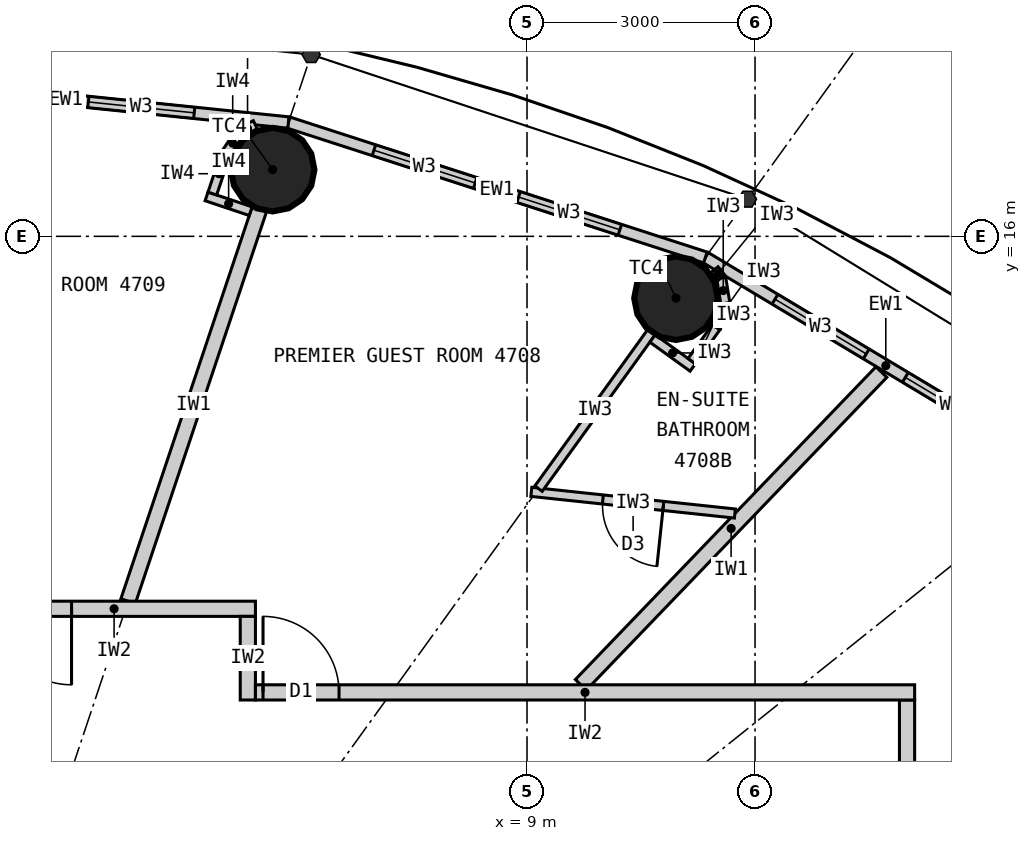
"""IFC4 building model, lengths in metres.
Left out: names, types, materials, properties, quantities, classifications, styles, units other than length and angle.
Written with IfcOpenShell. Run it as: python <this file> out.ifc"""

import sys

from ifc_helpers import new_model, si_unit, direction, frame, frame_2d, origin, origin_2d, place, context, subcontext, project, spatial, rectangle, circle, extrude, element, fill, save


model = new_model("IFC4")
c1 = context("Model", 3, precision=1e-05, world=origin(), true_north=direction((0.0, 1.0)))
c2 = subcontext(c1, "Body", "Model", "MODEL_VIEW")
j1 = project(units=[si_unit("LENGTHUNIT", "METRE"), si_unit("PLANEANGLEUNIT", "RADIAN")], contexts=[c1])
p1 = place(None, origin())
s1 = spatial("IfcSite", under=j1, at=p1, CompositionType="ELEMENT")
p2 = place(p1, origin())
s2 = spatial("IfcBuilding", under=s1, at=p2, CompositionType="ELEMENT")
p3 = place(p2, frame((0.0, 0.0, 176.4)))
s3 = spatial("IfcBuildingStorey", under=s2, at=p3, CompositionType="ELEMENT", Elevation=176.4)
for number, where, z_axis, x_axis in (
    (1, (10.96, 15.186, 0.0), (0.0, 0.0, 1.0), (1.0, 0.0, 0.0)),
    (2, (5.653, 16.877, 0.0), (0.0, 0.0, 1.0), (1.0, 0.0, 0.0)),
):
    element("IfcColumn", number, at=place(p3, frame(where, z_axis=z_axis, x_axis=x_axis)), inside=s3, PredefinedType="COLUMN", context=c2, shape_type="SweptSolid", body=[
        extrude(circle(Radius=0.55, at=origin_2d()), origin(), (0.0, 0.0, 1.0), 3.3),
    ])
p4 = place(p3, frame((16.095, 12.876, 0.0), z_axis=(0.0, 0.0, 1.0), x_axis=(-0.857695199231, 0.514158482587, 0.0)))
e3 = element("IfcWall", 3, at=p4, inside=s3, PredefinedType="ELEMENTEDWALL", context=c2, shape_type="SweptSolid", body=[
    extrude(rectangle(XDim=5.536, YDim=0.15, at=frame_2d((2.768, 0.0))), origin(), (0.0, 0.0, 1.0), 3.12),
])
p5 = place(p4, frame((1.068, 0.0, 0.9)))
e4 = element("IfcOpeningElement", 4, at=p5, cuts=e3, PredefinedType="OPENING", context=c2, shape_type="SweptSolid", body=[
    extrude(rectangle(XDim=1.4, YDim=1.9, at=frame_2d((0.7, 0.95))), frame((0.0, 0.085, 0.0), z_axis=(0.0, -1.0, 0.0), x_axis=(1.0, 0.0, 0.0)), (0.0, 0.0, 1.0), 0.17),
])
p6 = place(p4, frame((3.068, 0.0, 0.9)))
e5 = element("IfcOpeningElement", 5, at=p6, cuts=e3, PredefinedType="OPENING", context=c2, shape_type="SweptSolid", body=[
    extrude(rectangle(XDim=1.4, YDim=1.9, at=frame_2d((0.7, 0.95))), frame((0.0, 0.085, 0.0), z_axis=(0.0, -1.0, 0.0), x_axis=(1.0, 0.0, 0.0)), (0.0, 0.0, 1.0), 0.17),
])
p7 = place(p3, frame((11.346, 15.722, 0.0), z_axis=(0.0, 0.0, 1.0), x_axis=(-0.951432482129, 0.307857486429, 0.0)))
e6 = element("IfcWall", 6, at=p7, inside=s3, PredefinedType="ELEMENTEDWALL", context=c2, shape_type="SweptSolid", body=[
    extrude(rectangle(XDim=5.766, YDim=0.15, at=frame_2d((2.883, 0.0))), origin(), (0.0, 0.0, 1.0), 3.12),
])
p8 = place(p7, frame((1.183, 0.0, 0.9)))
e7 = element("IfcOpeningElement", 7, at=p8, cuts=e6, PredefinedType="OPENING", context=c2, shape_type="SweptSolid", body=[
    extrude(rectangle(XDim=1.4, YDim=1.9, at=frame_2d((0.7, 0.95))), frame((0.0, 0.085, 0.0), z_axis=(0.0, -1.0, 0.0), x_axis=(1.0, 0.0, 0.0)), (0.0, 0.0, 1.0), 0.17),
])
p9 = place(p7, frame((3.183, 0.0, 0.9)))
e8 = element("IfcOpeningElement", 8, at=p9, cuts=e6, PredefinedType="OPENING", context=c2, shape_type="SweptSolid", body=[
    extrude(rectangle(XDim=1.4, YDim=1.9, at=frame_2d((0.7, 0.95))), frame((0.0, 0.085, 0.0), z_axis=(0.0, -1.0, 0.0), x_axis=(1.0, 0.0, 0.0)), (0.0, 0.0, 1.0), 0.17),
])
p10 = place(p3, frame((5.86, 17.497, 0.0), z_axis=(0.0, 0.0, 1.0), x_axis=(-0.994751738032, 0.102318032045, 0.0)))
e9 = element("IfcWall", 9, at=p10, inside=s3, PredefinedType="ELEMENTEDWALL", context=c2, shape_type="SweptSolid", body=[
    extrude(rectangle(XDim=5.891, YDim=0.15, at=frame_2d((2.946, 0.0))), origin(), (0.0, 0.0, 1.0), 3.12),
])
p11 = place(p10, frame((1.246, 0.0, 0.9)))
e10 = element("IfcOpeningElement", 10, at=p11, cuts=e9, PredefinedType="OPENING", context=c2, shape_type="SweptSolid", body=[
    extrude(rectangle(XDim=1.4, YDim=1.9, at=frame_2d((0.7, 0.95))), frame((0.0, 0.085, 0.0), z_axis=(0.0, -1.0, 0.0), x_axis=(1.0, 0.0, 0.0)), (0.0, 0.0, 1.0), 0.17),
])
p12 = place(p10, frame((3.246, 0.0, 0.9)))
e11 = element("IfcOpeningElement", 11, at=p12, cuts=e9, PredefinedType="OPENING", context=c2, shape_type="SweptSolid", body=[
    extrude(rectangle(XDim=1.4, YDim=1.9, at=frame_2d((0.7, 0.95))), frame((0.0, 0.085, 0.0), z_axis=(0.0, -1.0, 0.0), x_axis=(1.0, 0.0, 0.0)), (0.0, 0.0, 1.0), 0.17),
])
p13 = place(p3, frame((14.0, -9.9, 0.0), z_axis=(0.0, 0.0, 1.0), x_axis=(0.0, 1.0, 0.0)))
e12 = element("IfcWall", 12, at=p13, inside=s3, PredefinedType="PARTITIONING", context=c2, shape_type="SweptSolid", body=[
    extrude(rectangle(XDim=19.8, YDim=0.2, at=frame_2d((9.9, 0.0))), origin(), (0.0, 0.0, 1.0), 3.12),
])
p14 = place(p13, frame((4.268, 0.0, 0.0)))
e13 = element("IfcOpeningElement", 13, at=p14, cuts=e12, PredefinedType="OPENING", context=c2, shape_type="SweptSolid", body=[
    extrude(rectangle(XDim=1.0, YDim=2.2, at=frame_2d((0.5, 1.1))), frame((0.0, 0.11, 0.0), z_axis=(0.0, -1.0, 0.0), x_axis=(1.0, 0.0, 0.0)), (0.0, 0.0, 1.0), 0.22),
])
p15 = place(p13, frame((7.177, 0.0, 0.0)))
e14 = element("IfcOpeningElement", 14, at=p15, cuts=e12, PredefinedType="OPENING", context=c2, shape_type="SweptSolid", body=[
    extrude(rectangle(XDim=1.0, YDim=2.2, at=frame_2d((0.5, 1.1))), frame((0.0, 0.11, 0.0), z_axis=(0.0, -1.0, 0.0), x_axis=(1.0, 0.0, 0.0)), (0.0, 0.0, 1.0), 0.22),
])
p16 = place(p13, frame((17.701, 0.0, 0.0)))
e15 = element("IfcOpeningElement", 15, at=p16, cuts=e12, PredefinedType="OPENING", context=c2, shape_type="SweptSolid", body=[
    extrude(rectangle(XDim=1.0, YDim=2.2, at=frame_2d((0.5, 1.1))), frame((0.0, 0.11, 0.0), z_axis=(0.0, -1.0, 0.0), x_axis=(1.0, 0.0, 0.0)), (0.0, 0.0, 1.0), 0.22),
])
p17 = place(p3, frame((9.708, 10.1, 0.0), z_axis=(0.0, 0.0, 1.0), x_axis=(0.692978748441, 0.720958011405, 0.0)))
e16 = element("IfcWall", 16, at=p17, inside=s3, PredefinedType="PARTITIONING", context=c2, shape_type="SweptSolid", body=[
    extrude(rectangle(XDim=5.707, YDim=0.2, at=frame_2d((2.853, 0.0))), origin(), (0.0, 0.0, 1.0), 3.12),
])
p18 = place(p3, frame((3.751, 11.2, 0.0), z_axis=(0.0, 0.0, 1.0), x_axis=(0.317614803807, 0.948219824937, 0.0)))
e17 = element("IfcWall", 17, at=p18, inside=s3, PredefinedType="PARTITIONING", context=c2, shape_type="SweptSolid", body=[
    extrude(rectangle(XDim=5.438, YDim=0.2, at=frame_2d((2.719, 0.0))), origin(), (0.0, 0.0, 1.0), 2.42),
])
p19 = place(p3, frame((1.708, 11.1, 0.0), z_axis=(0.0, 0.0, 1.0), x_axis=(1.0, 0.0, 0.0)))
e18 = element("IfcWall", 18, at=p19, inside=s3, PredefinedType="PARTITIONING", context=c2, shape_type="SweptSolid", body=[
    extrude(rectangle(XDim=3.719, YDim=0.2, at=frame_2d((1.86, 0.0))), origin(), (0.0, 0.0, 1.0), 3.12),
])
p20 = place(p19, frame((0.3, 0.0, 0.0)))
e19 = element("IfcOpeningElement", 19, at=p20, cuts=e18, PredefinedType="OPENING", context=c2, shape_type="SweptSolid", body=[
    extrude(rectangle(XDim=1.0, YDim=2.2, at=frame_2d((0.5, 1.1))), frame((0.0, 0.11, 0.0), z_axis=(0.0, -1.0, 0.0), x_axis=(1.0, 0.0, 0.0)), (0.0, 0.0, 1.0), 0.22),
])
p21 = place(p3, frame((5.327, 9.9, 0.0), z_axis=(0.0, 0.0, 1.0), x_axis=(0.0, 1.0, 0.0)))
e20 = element("IfcWall", 20, at=p21, inside=s3, PredefinedType="PARTITIONING", context=c2, shape_type="SweptSolid", body=[
    extrude(rectangle(XDim=1.1, YDim=0.2, at=frame_2d((0.55, 0.0))), origin(), (0.0, 0.0, 1.0), 3.12),
])
p22 = place(p3, frame((11.735, 12.353, 0.0), z_axis=(0.0, 0.0, 1.0), x_axis=(-0.994390130276, 0.105774613256, 0.0)))
e21 = element("IfcWall", 21, at=p22, inside=s3, PredefinedType="PARTITIONING", context=c2, shape_type="SweptSolid", body=[
    extrude(rectangle(XDim=2.694, YDim=0.12, at=frame_2d((1.347, 0.0))), origin(), (0.0, 0.0, 1.0), 3.12),
])
p23 = place(p22, frame((0.947, 0.0, 0.0)))
e22 = element("IfcOpeningElement", 22, at=p23, cuts=e21, PredefinedType="OPENING", context=c2, shape_type="SweptSolid", body=[
    extrude(rectangle(XDim=0.8, YDim=2.1, at=frame_2d((0.4, 1.05))), frame((0.0, 0.07, 0.0), z_axis=(0.0, -1.0, 0.0), x_axis=(1.0, 0.0, 0.0)), (0.0, 0.0, 1.0), 0.14),
])
p24 = place(p3, frame((9.151, 12.681, 0.0), z_axis=(0.0, 0.0, 1.0), x_axis=(0.585258912334, 0.8108464747, 0.0)))
e23 = element("IfcWall", 23, at=p24, inside=s3, PredefinedType="PARTITIONING", context=c2, shape_type="SweptSolid", body=[
    extrude(rectangle(XDim=2.54, YDim=0.12, at=frame_2d((1.27, 0.0))), origin(), (0.0, 0.0, 1.0), 2.42),
])
p25 = place(p3, frame((10.651, 14.656, 0.0), z_axis=(0.0, 0.0, 1.0), x_axis=(0.810916094797, -0.585162445137, 0.0)))
e24 = element("IfcWall", 24, at=p25, inside=s3, PredefinedType="PARTITIONING", context=c2, shape_type="SweptSolid", body=[
    extrude(rectangle(XDim=0.652, YDim=0.12, at=frame_2d((0.326, 0.0))), origin(), (0.0, 0.0, 1.0), 3.12),
])
p26 = place(p3, frame((11.167, 14.359, 0.0), z_axis=(0.0, 0.0, 1.0), x_axis=(0.585263549799, 0.810843127415, 0.0)))
e25 = element("IfcWall", 25, at=p26, inside=s3, PredefinedType="PARTITIONING", context=c2, shape_type="SweptSolid", body=[
    extrude(rectangle(XDim=0.55, YDim=0.12, at=frame_2d((0.275, 0.0))), origin(), (0.0, 0.0, 1.0), 3.12),
])
for number, where, z_axis, x_axis in (
    (26, (11.489, 14.804, 0.0), (0.0, 0.0, 1.0), (0.356, 0.935, 0.0)),
    (27, (11.609, 15.12, 0.0), (0.0, 0.0, 1.0), (-0.16, 0.987, 0.0)),
):
    element("IfcWall", number, at=place(p3, frame(where, z_axis=z_axis, x_axis=x_axis)), inside=s3, PredefinedType="PARTITIONING", context=c2, shape_type="SweptSolid", body=[
        extrude(rectangle(XDim=0.338, YDim=0.12, at=frame_2d((0.169, 0.0))), origin(), (0.0, 0.0, 1.0), 3.12),
    ])
p27 = place(p3, frame((11.555, 15.453, 0.0), z_axis=(0.0, 0.0, 1.0), x_axis=(-0.631711901025, 0.775203246964, 0.0)))
e28 = element("IfcWall", 28, at=p27, inside=s3, PredefinedType="PARTITIONING", context=c2, shape_type="SweptSolid", body=[
    extrude(rectangle(XDim=0.139, YDim=0.12, at=frame_2d((0.07, 0.0))), origin(), (0.0, 0.0, 1.0), 3.12),
])
p28 = place(p3, frame((5.427, 10.0, 0.0), z_axis=(0.0, 0.0, 1.0), x_axis=(1.0, 0.0, 0.0)))
e29 = element("IfcWall", 29, at=p28, inside=s3, PredefinedType="PARTITIONING", context=c2, shape_type="SweptSolid", body=[
    extrude(rectangle(XDim=8.673, YDim=0.2, at=frame_2d((4.337, 0.0))), origin(), (0.0, 0.0, 1.0), 3.12),
])
p29 = place(p28, frame((0.1, 0.0, 0.0)))
e30 = element("IfcOpeningElement", 30, at=p29, cuts=e29, PredefinedType="OPENING", context=c2, shape_type="SweptSolid", body=[
    extrude(rectangle(XDim=1.0, YDim=2.2, at=frame_2d((0.5, 1.1))), frame((0.0, 0.11, 0.0), z_axis=(0.0, -1.0, 0.0), x_axis=(1.0, 0.0, 0.0)), (0.0, 0.0, 1.0), 0.22),
])
p30 = place(p3, frame((5.364, 16.331, 0.0), z_axis=(0.0, 0.0, 1.0), x_axis=(-0.948283770087, 0.317423835572, 0.0)))
e31 = element("IfcWall", 31, at=p30, inside=s3, PredefinedType="PARTITIONING", context=c2, shape_type="SweptSolid", body=[
    extrude(rectangle(XDim=0.612, YDim=0.12, at=frame_2d((0.306, 0.0))), origin(), (0.0, 0.0, 1.0), 3.12),
])
p31 = place(p3, frame((4.86, 16.563, 0.0), z_axis=(0.0, 0.0, 1.0), x_axis=(0.317825321803, 0.948149284038, 0.0)))
e32 = element("IfcWall", 32, at=p31, inside=s3, PredefinedType="PARTITIONING", context=c2, shape_type="SweptSolid", body=[
    extrude(rectangle(XDim=0.55, YDim=0.12, at=frame_2d((0.275, 0.0))), origin(), (0.0, 0.0, 1.0), 3.12),
])
p32 = place(p3, frame((5.034, 17.084, 0.0), z_axis=(0.0, 0.0, 1.0), x_axis=(0.552362205726, 0.833604218851, 0.0)))
e33 = element("IfcWall", 33, at=p32, inside=s3, PredefinedType="PARTITIONING", context=c2, shape_type="SweptSolid", body=[
    extrude(rectangle(XDim=0.338, YDim=0.12, at=frame_2d((0.169, 0.0))), origin(), (0.0, 0.0, 1.0), 3.12),
])
p33 = place(p3, frame((5.221, 17.366, 0.0), z_axis=(0.0, 0.0, 1.0), x_axis=(0.895067896179, 0.445929883759, 0.0)))
e34 = element("IfcWall", 34, at=p33, inside=s3, PredefinedType="PARTITIONING", context=c2, shape_type="SweptSolid", body=[
    extrude(rectangle(XDim=0.228, YDim=0.12, at=frame_2d((0.114, 0.0))), origin(), (0.0, 0.0, 1.0), 3.12),
])
p34 = place(p5, origin())
e35 = element("IfcWindow", 35, at=p34, inside=s3, PartitioningType="SINGLE_PANEL", PredefinedType="WINDOW", context=c2, shape_type="SweptSolid", body=[
    extrude(rectangle(XDim=1.4, YDim=1.9, at=frame_2d((0.7, 0.95))), frame((0.0, 0.03, 0.0), z_axis=(0.0, -1.0, 0.0), x_axis=(1.0, 0.0, 0.0)), (0.0, 0.0, 1.0), 0.06),
])
fill(e4, e35)
p35 = place(p6, origin())
e36 = element("IfcWindow", 36, at=p35, inside=s3, PartitioningType="SINGLE_PANEL", PredefinedType="WINDOW", context=c2, shape_type="SweptSolid", body=[
    extrude(rectangle(XDim=1.4, YDim=1.9, at=frame_2d((0.7, 0.95))), frame((0.0, 0.03, 0.0), z_axis=(0.0, -1.0, 0.0), x_axis=(1.0, 0.0, 0.0)), (0.0, 0.0, 1.0), 0.06),
])
fill(e5, e36)
p36 = place(p8, origin())
e37 = element("IfcWindow", 37, at=p36, inside=s3, PartitioningType="SINGLE_PANEL", PredefinedType="WINDOW", context=c2, shape_type="SweptSolid", body=[
    extrude(rectangle(XDim=1.4, YDim=1.9, at=frame_2d((0.7, 0.95))), frame((0.0, 0.03, 0.0), z_axis=(0.0, -1.0, 0.0), x_axis=(1.0, 0.0, 0.0)), (0.0, 0.0, 1.0), 0.06),
])
fill(e7, e37)
p37 = place(p9, origin())
e38 = element("IfcWindow", 38, at=p37, inside=s3, PartitioningType="SINGLE_PANEL", PredefinedType="WINDOW", context=c2, shape_type="SweptSolid", body=[
    extrude(rectangle(XDim=1.4, YDim=1.9, at=frame_2d((0.7, 0.95))), frame((0.0, 0.03, 0.0), z_axis=(0.0, -1.0, 0.0), x_axis=(1.0, 0.0, 0.0)), (0.0, 0.0, 1.0), 0.06),
])
fill(e8, e38)
p38 = place(p11, origin())
e39 = element("IfcWindow", 39, at=p38, inside=s3, PartitioningType="SINGLE_PANEL", PredefinedType="WINDOW", context=c2, shape_type="SweptSolid", body=[
    extrude(rectangle(XDim=1.4, YDim=1.9, at=frame_2d((0.7, 0.95))), frame((0.0, 0.03, 0.0), z_axis=(0.0, -1.0, 0.0), x_axis=(1.0, 0.0, 0.0)), (0.0, 0.0, 1.0), 0.06),
])
fill(e10, e39)
p39 = place(p23, origin())
e40 = element("IfcDoor", 40, at=p39, inside=s3, OperationType="SINGLE_SWING_LEFT", PredefinedType="DOOR", context=c2, shape_type="SweptSolid", body=[
    extrude(rectangle(XDim=0.8, YDim=2.1, at=frame_2d((0.4, 1.05))), frame((0.0, 0.025, 0.0), z_axis=(0.0, -1.0, 0.0), x_axis=(1.0, 0.0, 0.0)), (0.0, 0.0, 1.0), 0.05),
])
fill(e22, e40)
p40 = place(p29, origin())
e41 = element("IfcDoor", 41, at=p40, inside=s3, OperationType="SINGLE_SWING_LEFT", PredefinedType="DOOR", context=c2, shape_type="SweptSolid", body=[
    extrude(rectangle(XDim=1.0, YDim=2.2, at=frame_2d((0.5, 1.1))), frame((0.0, 0.025, 0.0), z_axis=(0.0, -1.0, 0.0), x_axis=(1.0, 0.0, 0.0)), (0.0, 0.0, 1.0), 0.05),
])
fill(e30, e41)
p41 = place(p20, origin())
e42 = element("IfcDoor", 42, at=p41, inside=s3, OperationType="SINGLE_SWING_RIGHT", PredefinedType="DOOR", context=c2, shape_type="SweptSolid", body=[
    extrude(rectangle(XDim=1.0, YDim=2.2, at=frame_2d((0.5, 1.1))), frame((0.0, 0.025, 0.0), z_axis=(0.0, -1.0, 0.0), x_axis=(1.0, 0.0, 0.0)), (0.0, 0.0, 1.0), 0.05),
])
fill(e19, e42)
save(model, sys.argv[1])
